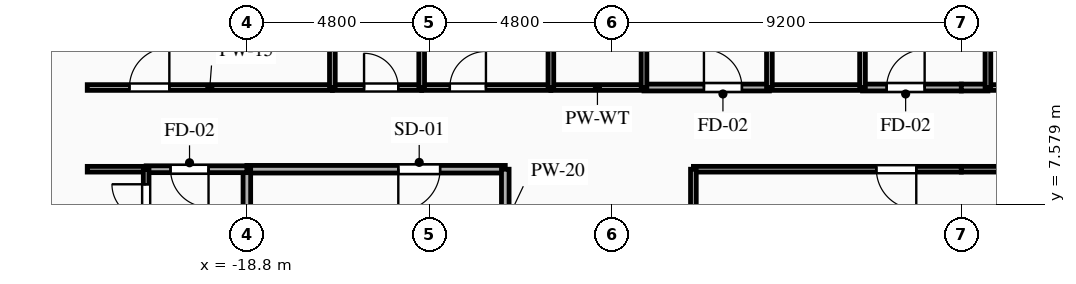
"""IFC4 building model, lengths in metres.
Left out: names, types, materials, properties, quantities, classifications, styles, units other than length and angle.
Written with IfcOpenShell. Run it as: python <this file> out.ifc"""

import sys

from ifc_helpers import new_model, si_unit, direction, frame, frame_2d, origin, place, context, subcontext, project, spatial, rectangle, extrude, element, fill, save


model = new_model("IFC4")
c1 = context("Model", 3, precision=1e-05, world=origin(), true_north=direction((0.0, 1.0)))
c2 = subcontext(c1, "Body", "Model", "MODEL_VIEW")
j1 = project(units=[si_unit("LENGTHUNIT", "METRE"), si_unit("PLANEANGLEUNIT", "RADIAN")], contexts=[c1])
p1 = place(None, origin())
s1 = spatial("IfcSite", under=j1, at=p1, CompositionType="ELEMENT")
p2 = place(p1, origin())
s2 = spatial("IfcBuilding", under=s1, at=p2, CompositionType="ELEMENT")
p3 = place(p2, frame((0.0, 0.0, 60.5)))
s3 = spatial("IfcBuildingStorey", under=s2, at=p3, CompositionType="ELEMENT", Elevation=60.5)
p4 = place(p3, frame((-12.0, 8.5, 0.0), z_axis=(0.0, 0.0, 1.0), x_axis=(-1.0, 0.0, 0.0)))
e1 = element("IfcWall", 1, at=p4, inside=s3, PredefinedType="PARTITIONING", context=c2, shape_type="SweptSolid", body=[
    extrude(rectangle(XDim=6.8, YDim=0.2, at=frame_2d((3.4, 0.0))), origin(), (0.0, 0.0, 1.0), 3.035),
])
p5 = place(p4, frame((1.715, 0.0, 0.0)))
e2 = element("IfcOpeningElement", 2, at=p5, cuts=e1, PredefinedType="OPENING", context=c2, shape_type="SweptSolid", body=[
    extrude(rectangle(XDim=1.1, YDim=2.15, at=frame_2d((0.55, 1.075))), frame((0.0, 0.11, 0.0), z_axis=(0.0, -1.0, 0.0), x_axis=(1.0, 0.0, 0.0)), (0.0, 0.0, 1.0), 0.22),
])
p6 = place(p3, frame((-12.0, 5.6, 0.0), z_axis=(0.0, 0.0, 1.0), x_axis=(0.0, 1.0, 0.0)))
e3 = element("IfcWall", 3, at=p6, inside=s3, PredefinedType="PARTITIONING", context=c2, shape_type="SweptSolid", body=[
    extrude(rectangle(XDim=2.9, YDim=0.2, at=frame_2d((1.45, 0.0))), origin(), (0.0, 0.0, 1.0), 3.035),
])
p7 = place(p3, frame((-18.8, 8.5, 0.0), z_axis=(0.0, 0.0, 1.0), x_axis=(0.0, -1.0, 0.0)))
e4 = element("IfcWall", 4, at=p7, inside=s3, PredefinedType="PARTITIONING", context=c2, shape_type="SweptSolid", body=[
    extrude(rectangle(XDim=2.9, YDim=0.2, at=frame_2d((1.45, 0.0))), origin(), (0.0, 0.0, 1.0), 2.52),
])
p8 = place(p3, frame((-18.8, 8.5, 0.0), z_axis=(0.0, 0.0, 1.0), x_axis=(-1.0, 0.0, 0.0)))
e5 = element("IfcWall", 5, at=p8, inside=s3, PredefinedType="PARTITIONING", context=c2, shape_type="SweptSolid", body=[
    extrude(rectangle(XDim=2.65, YDim=0.18, at=frame_2d((1.325, 0.0))), origin(), (0.0, 0.0, 1.0), 3.035),
])
p9 = place(p8, frame((1.009, 0.0, 0.0)))
e6 = element("IfcOpeningElement", 6, at=p9, cuts=e5, PredefinedType="OPENING", context=c2, shape_type="SweptSolid", body=[
    extrude(rectangle(XDim=1.0, YDim=2.15, at=frame_2d((0.5, 1.075))), frame((0.0, 0.1, 0.0), z_axis=(0.0, -1.0, 0.0), x_axis=(1.0, 0.0, 0.0)), (0.0, 0.0, 1.0), 0.2),
])
p10 = place(p3, frame((-21.45, 8.5, 0.0), z_axis=(0.0, 0.0, 1.0), x_axis=(-1.0, 0.0, 0.0)))
e7 = element("IfcWall", 7, at=p10, inside=s3, PredefinedType="PARTITIONING", context=c2, shape_type="SweptSolid", body=[
    extrude(rectangle(XDim=1.55, YDim=0.15, at=frame_2d((0.775, 0.0))), origin(), (0.0, 0.0, 1.0), 3.035),
])
p11 = place(p3, frame((-23.0, 10.65, 0.0), z_axis=(0.0, 0.0, 1.0), x_axis=(1.0, 0.0, 0.0)))
e8 = element("IfcWall", 8, at=p11, inside=s3, PredefinedType="PARTITIONING", context=c2, shape_type="SweptSolid", body=[
    extrude(rectangle(XDim=6.45, YDim=0.15, at=frame_2d((3.225, 0.0))), origin(), (0.0, 0.0, 1.0), 3.035),
])
p12 = place(p11, frame((1.11, 0.0, 0.0)))
e9 = element("IfcOpeningElement", 9, at=p12, cuts=e8, PredefinedType="OPENING", context=c2, shape_type="SweptSolid", body=[
    extrude(rectangle(XDim=1.05, YDim=2.15, at=frame_2d((0.525, 1.075))), frame((0.0, 0.085, 0.0), z_axis=(0.0, -1.0, 0.0), x_axis=(1.0, 0.0, 0.0)), (0.0, 0.0, 1.0), 0.17),
])
p13 = place(p3, frame((-16.55, 10.65, 0.0), z_axis=(0.0, 0.0, 1.0), x_axis=(1.0, 0.0, 0.0)))
e10 = element("IfcWall", 10, at=p13, inside=s3, PredefinedType="PLUMBINGWALL", context=c2, shape_type="SweptSolid", body=[
    extrude(rectangle(XDim=2.35, YDim=0.15, at=frame_2d((1.175, 0.0))), origin(), (0.0, 0.0, 1.0), 3.035),
])
p14 = place(p13, frame((0.834, 0.0, 0.0)))
e11 = element("IfcOpeningElement", 11, at=p14, cuts=e10, PredefinedType="OPENING", context=c2, shape_type="SweptSolid", body=[
    extrude(rectangle(XDim=0.9, YDim=2.1, at=frame_2d((0.45, 1.05))), frame((0.0, 0.085, 0.0), z_axis=(0.0, -1.0, 0.0), x_axis=(1.0, 0.0, 0.0)), (0.0, 0.0, 1.0), 0.17),
])
p15 = place(p3, frame((-14.2, 10.65, 0.0), z_axis=(0.0, 0.0, 1.0), x_axis=(1.0, 0.0, 0.0)))
e12 = element("IfcWall", 12, at=p15, inside=s3, PredefinedType="PARTITIONING", context=c2, shape_type="SweptSolid", body=[
    extrude(rectangle(XDim=3.4, YDim=0.15, at=frame_2d((1.7, 0.0))), origin(), (0.0, 0.0, 1.0), 3.035),
])
p16 = place(p15, frame((0.741, 0.0, 0.0)))
e13 = element("IfcOpeningElement", 13, at=p16, cuts=e12, PredefinedType="OPENING", context=c2, shape_type="SweptSolid", body=[
    extrude(rectangle(XDim=0.95, YDim=2.1, at=frame_2d((0.475, 1.05))), frame((0.0, 0.085, 0.0), z_axis=(0.0, -1.0, 0.0), x_axis=(1.0, 0.0, 0.0)), (0.0, 0.0, 1.0), 0.17),
])
p17 = place(p3, frame((-8.35, 10.65, 0.0), z_axis=(0.0, 0.0, 1.0), x_axis=(1.0, 0.0, 0.0)))
e14 = element("IfcWall", 14, at=p17, inside=s3, PredefinedType="PARTITIONING", context=c2, shape_type="SweptSolid", body=[
    extrude(rectangle(XDim=3.3, YDim=0.18, at=frame_2d((1.65, 0.0))), origin(), (0.0, 0.0, 1.0), 3.035),
])
p18 = place(p17, frame((1.577, 0.0, 0.0)))
e15 = element("IfcOpeningElement", 15, at=p18, cuts=e14, PredefinedType="OPENING", context=c2, shape_type="SweptSolid", body=[
    extrude(rectangle(XDim=1.0, YDim=2.15, at=frame_2d((0.5, 1.075))), frame((0.0, 0.1, 0.0), z_axis=(0.0, -1.0, 0.0), x_axis=(1.0, 0.0, 0.0)), (0.0, 0.0, 1.0), 0.2),
])
p19 = place(p3, frame((-10.8, 10.65, 0.0), z_axis=(0.0, 0.0, 1.0), x_axis=(1.0, 0.0, 0.0)))
e16 = element("IfcWall", 16, at=p19, inside=s3, PredefinedType="PLUMBINGWALL", context=c2, shape_type="SweptSolid", body=[
    extrude(rectangle(XDim=2.45, YDim=0.15, at=frame_2d((1.225, 0.0))), origin(), (0.0, 0.0, 1.0), 3.035),
])
p20 = place(p3, frame((-2.6, 10.65, 0.0), z_axis=(0.0, 0.0, 1.0), x_axis=(1.0, 0.0, 0.0)))
e17 = element("IfcWall", 17, at=p20, inside=s3, PredefinedType="PARTITIONING", context=c2, shape_type="SweptSolid", body=[
    extrude(rectangle(XDim=2.6, YDim=0.18, at=frame_2d((1.3, 0.0))), origin(), (0.0, 0.0, 1.0), 3.035),
])
p21 = place(p20, frame((0.635, 0.0, 0.0)))
e18 = element("IfcOpeningElement", 18, at=p21, cuts=e17, PredefinedType="OPENING", context=c2, shape_type="SweptSolid", body=[
    extrude(rectangle(XDim=1.0, YDim=2.15, at=frame_2d((0.5, 1.075))), frame((0.0, 0.1, 0.0), z_axis=(0.0, -1.0, 0.0), x_axis=(1.0, 0.0, 0.0)), (0.0, 0.0, 1.0), 0.2),
])
p22 = place(p3, frame((-5.05, 10.65, 0.0), z_axis=(0.0, 0.0, 1.0), x_axis=(1.0, 0.0, 0.0)))
e19 = element("IfcWall", 19, at=p22, inside=s3, PredefinedType="PLUMBINGWALL", context=c2, shape_type="SweptSolid", body=[
    extrude(rectangle(XDim=2.45, YDim=0.15, at=frame_2d((1.225, 0.0))), origin(), (0.0, 0.0, 1.0), 3.035),
])
p23 = place(p3, frame((0.0, 8.5, 0.0), z_axis=(0.0, 0.0, 1.0), x_axis=(-1.0, 0.0, 0.0)))
e20 = element("IfcWall", 20, at=p23, inside=s3, PredefinedType="PARTITIONING", context=c2, shape_type="SweptSolid", body=[
    extrude(rectangle(XDim=7.05, YDim=0.15, at=frame_2d((3.525, 0.0))), origin(), (0.0, 0.0, 1.0), 3.035),
])
p24 = place(p23, frame((1.185, 0.0, 0.0)))
e21 = element("IfcOpeningElement", 21, at=p24, cuts=e20, PredefinedType="OPENING", context=c2, shape_type="SweptSolid", body=[
    extrude(rectangle(XDim=1.05, YDim=2.15, at=frame_2d((0.525, 1.075))), frame((0.0, 0.085, 0.0), z_axis=(0.0, -1.0, 0.0), x_axis=(1.0, 0.0, 0.0)), (0.0, 0.0, 1.0), 0.17),
])
p25 = place(p3, frame((0.0, 10.65, 0.0), z_axis=(0.0, 0.0, 1.0), x_axis=(1.0, 0.0, 0.0)))
e22 = element("IfcWall", 22, at=p25, inside=s3, PredefinedType="PARTITIONING", context=c2, shape_type="SweptSolid", body=[
    extrude(rectangle(XDim=0.7, YDim=0.18, at=frame_2d((0.35, 0.0))), origin(), (0.0, 0.0, 1.0), 3.035),
])
p26 = place(p3, frame((0.7, 10.65, 0.0), z_axis=(0.0, 0.0, 1.0), x_axis=(1.0, 0.0, 0.0)))
e23 = element("IfcWall", 23, at=p26, inside=s3, PredefinedType="PLUMBINGWALL", context=c2, shape_type="SweptSolid", body=[
    extrude(rectangle(XDim=2.45, YDim=0.15, at=frame_2d((1.225, 0.0))), origin(), (0.0, 0.0, 1.0), 3.035),
])
for number, where, z_axis, x_axis in (
    (24, (7.05, 8.5, 0.0), (0.0, 0.0, 1.0), (-1.0, 0.0, 0.0)),
    (25, (-7.05, 8.5, 0.0), (0.0, 0.0, 1.0), (0.0, -1.0, 0.0)),
):
    element("IfcWall", number, at=place(p3, frame(where, z_axis=z_axis, x_axis=x_axis)), inside=s3, PredefinedType="PARTITIONING", context=c2, shape_type="SweptSolid", body=[
        extrude(rectangle(XDim=7.05, YDim=0.15, at=frame_2d((3.525, 0.0))), origin(), (0.0, 0.0, 1.0), 3.035),
    ])
p27 = place(p3, frame((-21.45, 6.808, 0.0), z_axis=(0.0, 0.0, 1.0), x_axis=(0.0, 1.0, 0.0)))
e26 = element("IfcWall", 26, at=p27, inside=s3, PredefinedType="PARTITIONING", context=c2, shape_type="SweptSolid", body=[
    extrude(rectangle(XDim=1.692, YDim=0.15, at=frame_2d((0.846, 0.0))), origin(), (0.0, 0.0, 1.0), 3.035),
])
p28 = place(p27, frame((0.396, 0.0, 0.0)))
e27 = element("IfcOpeningElement", 27, at=p28, cuts=e26, PredefinedType="OPENING", context=c2, shape_type="SweptSolid", body=[
    extrude(rectangle(XDim=0.9, YDim=2.1, at=frame_2d((0.45, 1.05))), frame((0.0, 0.085, 0.0), z_axis=(0.0, -1.0, 0.0), x_axis=(1.0, 0.0, 0.0)), (0.0, 0.0, 1.0), 0.17),
])
for number, where, z_axis, x_axis in (
    (28, (-16.55, 19.4, 0.0), (0.0, 0.0, 1.0), (0.0, -1.0, 0.0)),
    (29, (-14.2, 19.4, 0.0), (0.0, 0.0, 1.0), (0.0, -1.0, 0.0)),
):
    element("IfcWall", number, at=place(p3, frame(where, z_axis=z_axis, x_axis=x_axis)), inside=s3, PredefinedType="PLUMBINGWALL", context=c2, shape_type="SweptSolid", body=[
        extrude(rectangle(XDim=8.75, YDim=0.15, at=frame_2d((4.375, 0.0))), origin(), (0.0, 0.0, 1.0), 3.035),
    ])
for number, where, z_axis, x_axis in (
    (30, (-10.8, 12.8, 0.0), (0.0, 0.0, 1.0), (0.0, -1.0, 0.0)),
    (31, (-8.35, 10.65, 0.0), (0.0, 0.0, 1.0), (0.0, 1.0, 0.0)),
    (32, (-5.05, 12.8, 0.0), (0.0, 0.0, 1.0), (0.0, -1.0, 0.0)),
    (33, (-2.6, 10.65, 0.0), (0.0, 0.0, 1.0), (0.0, 1.0, 0.0)),
    (34, (0.7, 12.8, 0.0), (0.0, 0.0, 1.0), (0.0, -1.0, 0.0)),
):
    element("IfcWall", number, at=place(p3, frame(where, z_axis=z_axis, x_axis=x_axis)), inside=s3, PredefinedType="PLUMBINGWALL", context=c2, shape_type="SweptSolid", body=[
        extrude(rectangle(XDim=2.15, YDim=0.15, at=frame_2d((1.075, 0.0))), origin(), (0.0, 0.0, 1.0), 3.035),
    ])
p29 = place(p5, origin())
e35 = element("IfcDoor", 35, at=p29, inside=s3, OperationType="SINGLE_SWING_RIGHT", PredefinedType="DOOR", context=c2, shape_type="SweptSolid", body=[
    extrude(rectangle(XDim=1.1, YDim=2.15, at=frame_2d((0.55, 1.075))), frame((0.0, 0.025, 0.0), z_axis=(0.0, -1.0, 0.0), x_axis=(1.0, 0.0, 0.0)), (0.0, 0.0, 1.0), 0.05),
])
fill(e2, e35)
p30 = place(p9, origin())
e36 = element("IfcDoor", 36, at=p30, inside=s3, OperationType="SINGLE_SWING_LEFT", PredefinedType="DOOR", context=c2, shape_type="SweptSolid", body=[
    extrude(rectangle(XDim=1.0, YDim=2.15, at=frame_2d((0.5, 1.075))), frame((0.0, 0.025, 0.0), z_axis=(0.0, -1.0, 0.0), x_axis=(1.0, 0.0, 0.0)), (0.0, 0.0, 1.0), 0.05),
])
fill(e6, e36)
p31 = place(p12, origin())
e37 = element("IfcDoor", 37, at=p31, inside=s3, OperationType="SINGLE_SWING_RIGHT", PredefinedType="DOOR", context=c2, shape_type="SweptSolid", body=[
    extrude(rectangle(XDim=1.05, YDim=2.15, at=frame_2d((0.525, 1.075))), frame((0.0, 0.025, 0.0), z_axis=(0.0, -1.0, 0.0), x_axis=(1.0, 0.0, 0.0)), (0.0, 0.0, 1.0), 0.05),
])
fill(e9, e37)
p32 = place(p14, origin())
e38 = element("IfcDoor", 38, at=p32, inside=s3, OperationType="SINGLE_SWING_LEFT", PredefinedType="DOOR", context=c2, shape_type="SweptSolid", body=[
    extrude(rectangle(XDim=0.9, YDim=2.1, at=frame_2d((0.45, 1.05))), frame((0.0, 0.025, 0.0), z_axis=(0.0, -1.0, 0.0), x_axis=(1.0, 0.0, 0.0)), (0.0, 0.0, 1.0), 0.05),
])
fill(e11, e38)
p33 = place(p16, origin())
e39 = element("IfcDoor", 39, at=p33, inside=s3, OperationType="SINGLE_SWING_RIGHT", PredefinedType="DOOR", context=c2, shape_type="SweptSolid", body=[
    extrude(rectangle(XDim=0.95, YDim=2.1, at=frame_2d((0.475, 1.05))), frame((0.0, 0.025, 0.0), z_axis=(0.0, -1.0, 0.0), x_axis=(1.0, 0.0, 0.0)), (0.0, 0.0, 1.0), 0.05),
])
fill(e13, e39)
p34 = place(p18, origin())
e40 = element("IfcDoor", 40, at=p34, inside=s3, OperationType="SINGLE_SWING_LEFT", PredefinedType="DOOR", context=c2, shape_type="SweptSolid", body=[
    extrude(rectangle(XDim=1.0, YDim=2.15, at=frame_2d((0.5, 1.075))), frame((0.0, 0.025, 0.0), z_axis=(0.0, -1.0, 0.0), x_axis=(1.0, 0.0, 0.0)), (0.0, 0.0, 1.0), 0.05),
])
fill(e15, e40)
p35 = place(p21, origin())
e41 = element("IfcDoor", 41, at=p35, inside=s3, OperationType="SINGLE_SWING_RIGHT", PredefinedType="DOOR", context=c2, shape_type="SweptSolid", body=[
    extrude(rectangle(XDim=1.0, YDim=2.15, at=frame_2d((0.5, 1.075))), frame((0.0, 0.025, 0.0), z_axis=(0.0, -1.0, 0.0), x_axis=(1.0, 0.0, 0.0)), (0.0, 0.0, 1.0), 0.05),
])
fill(e18, e41)
p36 = place(p24, origin())
e42 = element("IfcDoor", 42, at=p36, inside=s3, OperationType="SINGLE_SWING_LEFT", PredefinedType="DOOR", context=c2, shape_type="SweptSolid", body=[
    extrude(rectangle(XDim=1.05, YDim=2.15, at=frame_2d((0.525, 1.075))), frame((0.0, 0.025, 0.0), z_axis=(0.0, -1.0, 0.0), x_axis=(1.0, 0.0, 0.0)), (0.0, 0.0, 1.0), 0.05),
])
fill(e21, e42)
p37 = place(p28, origin())
e43 = element("IfcDoor", 43, at=p37, inside=s3, OperationType="SINGLE_SWING_RIGHT", PredefinedType="DOOR", context=c2, shape_type="SweptSolid", body=[
    extrude(rectangle(XDim=0.9, YDim=2.1, at=frame_2d((0.45, 1.05))), frame((0.0, 0.025, 0.0), z_axis=(0.0, -1.0, 0.0), x_axis=(1.0, 0.0, 0.0)), (0.0, 0.0, 1.0), 0.05),
])
fill(e27, e43)
save(model, sys.argv[1])
